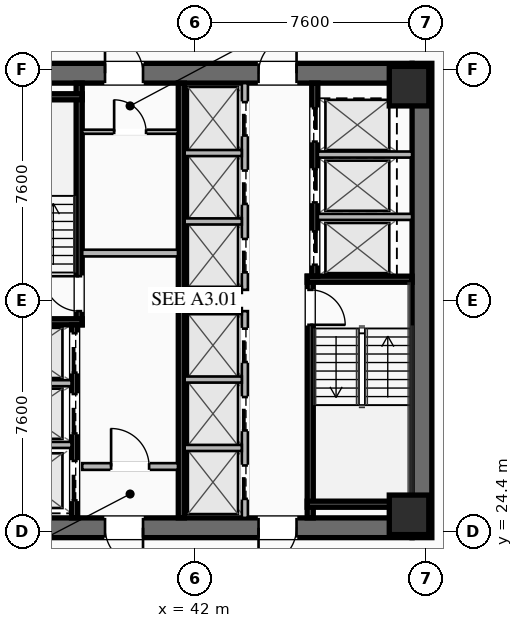
"""IFC4 building model, lengths in metres.
Left out: names, types, materials, properties, quantities, classifications, styles, units other than length and angle.
Written with IfcOpenShell. Run it as: python <this file> out.ifc"""

import sys

from ifc_helpers import new_model, si_unit, direction, frame, frame_2d, origin, origin_2d, place, context, subcontext, project, spatial, rectangle, hollow_rectangle, extrude, element, fill, save


model = new_model("IFC4")
c1 = context("Model", 3, precision=1e-05, world=origin(), true_north=direction((0.0, 1.0)))
c2 = subcontext(c1, "Body", "Model", "MODEL_VIEW")
j1 = project(units=[si_unit("LENGTHUNIT", "METRE"), si_unit("PLANEANGLEUNIT", "RADIAN")], contexts=[c1])
p1 = place(None, origin())
s1 = spatial("IfcSite", under=j1, at=p1, CompositionType="ELEMENT")
p2 = place(p1, origin())
s2 = spatial("IfcBuilding", under=s1, at=p2, CompositionType="ELEMENT")
p3 = place(p2, frame((0.0, 0.0, 106.25)))
s3 = spatial("IfcBuildingStorey", under=s2, at=p3, CompositionType="ELEMENT", Elevation=106.25)
p4 = place(p3, frame((49.475, 39.8, 0.0), z_axis=(0.0, 0.0, 1.0), x_axis=(0.0, -1.0, 0.0)))
e1 = element("IfcWall", 1, at=p4, inside=s3, PredefinedType="SHEAR", context=c2, shape_type="SweptSolid", body=[
    extrude(rectangle(XDim=15.6, YDim=0.65, at=frame_2d((7.8, 0.0))), origin(), (0.0, 0.0, 1.0), 3.55),
])
p5 = place(p3, frame((49.15, 24.525, 0.0), z_axis=(0.0, 0.0, 1.0), x_axis=(-1.0, 0.0, 0.0)))
e2 = element("IfcWall", 2, at=p5, inside=s3, PredefinedType="SHEAR", context=c2, shape_type="SweptSolid", body=[
    extrude(rectangle(XDim=14.3, YDim=0.65, at=frame_2d((7.15, 0.0))), origin(), (0.0, 0.0, 1.0), 3.55),
])
p6 = place(p5, frame((8.85, 0.0, 0.0)))
e3 = element("IfcOpeningElement", 3, at=p6, cuts=e2, PredefinedType="OPENING", context=c2, shape_type="SweptSolid", body=[
    extrude(rectangle(XDim=1.25, YDim=2.25, at=frame_2d((0.625, 1.125))), frame((0.0, 0.335, 0.0), z_axis=(0.0, -1.0, 0.0), x_axis=(1.0, 0.0, 0.0)), (0.0, 0.0, 1.0), 0.67),
])
p7 = place(p5, frame((3.8, 0.0, 0.0)))
e4 = element("IfcOpeningElement", 4, at=p7, cuts=e2, PredefinedType="OPENING", context=c2, shape_type="SweptSolid", body=[
    extrude(rectangle(XDim=1.25, YDim=2.25, at=frame_2d((0.625, 1.125))), frame((0.0, 0.335, 0.0), z_axis=(0.0, -1.0, 0.0), x_axis=(1.0, 0.0, 0.0)), (0.0, 0.0, 1.0), 0.67),
])
p8 = place(p3, frame((34.85, 39.475, 0.0), z_axis=(0.0, 0.0, 1.0), x_axis=(1.0, 0.0, 0.0)))
e5 = element("IfcWall", 5, at=p8, inside=s3, PredefinedType="SHEAR", context=c2, shape_type="SweptSolid", body=[
    extrude(rectangle(XDim=14.3, YDim=0.65, at=frame_2d((7.15, 0.0))), origin(), (0.0, 0.0, 1.0), 3.55),
])
p9 = place(p8, frame((4.2, 0.0, 0.0)))
e6 = element("IfcOpeningElement", 6, at=p9, cuts=e5, PredefinedType="OPENING", context=c2, shape_type="SweptSolid", body=[
    extrude(rectangle(XDim=1.25, YDim=2.25, at=frame_2d((0.625, 1.125))), frame((0.0, 0.335, 0.0), z_axis=(0.0, -1.0, 0.0), x_axis=(1.0, 0.0, 0.0)), (0.0, 0.0, 1.0), 0.67),
])
p10 = place(p8, frame((9.25, 0.0, 0.0)))
e7 = element("IfcOpeningElement", 7, at=p10, cuts=e5, PredefinedType="OPENING", context=c2, shape_type="SweptSolid", body=[
    extrude(rectangle(XDim=1.25, YDim=2.25, at=frame_2d((0.625, 1.125))), frame((0.0, 0.335, 0.0), z_axis=(0.0, -1.0, 0.0), x_axis=(1.0, 0.0, 0.0)), (0.0, 0.0, 1.0), 0.67),
])
for number, where, z_axis, x_axis in (
    (8, (49.05, 24.95, 0.0), (0.0, 0.0, 1.0), (1.0, 0.0, 0.0)),
    (9, (49.05, 39.05, 0.0), (0.0, 0.0, 1.0), (1.0, 0.0, 0.0)),
):
    element("IfcColumn", number, at=place(p3, frame(where, z_axis=z_axis, x_axis=x_axis)), inside=s3, PredefinedType="COLUMN", context=c2, shape_type="SweptSolid", body=[
        extrude(hollow_rectangle(XDim=1.3, YDim=1.3, WallThickness=0.05, at=origin_2d()), origin(), (0.0, 0.0, 1.0), 3.25),
    ])
p11 = place(p3, frame((38.2, 31.2, 0.0), z_axis=(0.0, 0.0, 1.0), x_axis=(0.0, 1.0, 0.0)))
e10 = element("IfcWall", 10, at=p11, inside=s3, PredefinedType="SHEAR", context=c2, shape_type="SweptSolid", body=[
    extrude(rectangle(XDim=7.95, YDim=0.2, at=frame_2d((3.975, 0.0))), origin(), (0.0, 0.0, 1.0), 3.25),
])
p12 = place(p11, frame((0.45, 0.0, 0.0)))
e11 = element("IfcOpeningElement", 11, at=p12, cuts=e10, PredefinedType="OPENING", context=c2, shape_type="SweptSolid", body=[
    extrude(rectangle(XDim=1.15, YDim=2.2, at=frame_2d((0.575, 1.1))), frame((0.0, 0.11, 0.0), z_axis=(0.0, -1.0, 0.0), x_axis=(1.0, 0.0, 0.0)), (0.0, 0.0, 1.0), 0.22),
])
for number, where, z_axis, x_axis in (
    (12, (34.85, 31.3, 0.0), (0.0, 0.0, 1.0), (1.0, 0.0, 0.0)),
    (13, (34.85, 38.7, 0.0), (0.0, 0.0, 1.0), (1.0, 0.0, 0.0)),
):
    element("IfcWall", number, at=place(p3, frame(where, z_axis=z_axis, x_axis=x_axis)), inside=s3, PredefinedType="SHEAR", context=c2, shape_type="SweptSolid", body=[
        extrude(rectangle(XDim=3.45, YDim=0.2, at=frame_2d((1.725, 0.0))), origin(), (0.0, 0.0, 1.0), 3.25),
    ])
p13 = place(p3, frame((45.8, 32.8, 0.0), z_axis=(0.0, 0.0, 1.0), x_axis=(0.0, -1.0, 0.0)))
e14 = element("IfcWall", 14, at=p13, inside=s3, PredefinedType="SHEAR", context=c2, shape_type="SweptSolid", body=[
    extrude(rectangle(XDim=7.95, YDim=0.2, at=frame_2d((3.975, 0.0))), origin(), (0.0, 0.0, 1.0), 3.25),
])
p14 = place(p13, frame((0.45, 0.0, 0.0)))
e15 = element("IfcOpeningElement", 15, at=p14, cuts=e14, PredefinedType="OPENING", context=c2, shape_type="SweptSolid", body=[
    extrude(rectangle(XDim=1.15, YDim=2.2, at=frame_2d((0.575, 1.1))), frame((0.0, 0.11, 0.0), z_axis=(0.0, -1.0, 0.0), x_axis=(1.0, 0.0, 0.0)), (0.0, 0.0, 1.0), 0.22),
])
for number, where, z_axis, x_axis in (
    (16, (45.7, 32.7, 0.0), (0.0, 0.0, 1.0), (1.0, 0.0, 0.0)),
    (17, (45.7, 25.3, 0.0), (0.0, 0.0, 1.0), (1.0, 0.0, 0.0)),
):
    element("IfcWall", number, at=place(p3, frame(where, z_axis=z_axis, x_axis=x_axis)), inside=s3, PredefinedType="SHEAR", context=c2, shape_type="SweptSolid", body=[
        extrude(rectangle(XDim=3.45, YDim=0.2, at=frame_2d((1.725, 0.0))), origin(), (0.0, 0.0, 1.0), 3.25),
    ])
p15 = place(p3, frame((41.56, 24.85, 0.0), z_axis=(0.0, 0.0, 1.0), x_axis=(0.0, 1.0, 0.0)))
e18 = element("IfcWall", 18, at=p15, inside=s3, PredefinedType="SHEAR", context=c2, shape_type="SweptSolid", body=[
    extrude(rectangle(XDim=14.3, YDim=0.2, at=frame_2d((7.15, 0.0))), origin(), (0.0, 0.0, 1.0), 3.25),
])
p16 = place(p3, frame((38.3, 33.56, 0.0), z_axis=(0.0, 0.0, 1.0), x_axis=(1.0, 0.0, 0.0)))
e19 = element("IfcWall", 19, at=p16, inside=s3, PredefinedType="SOLIDWALL", context=c2, shape_type="SweptSolid", body=[
    extrude(rectangle(XDim=3.15, YDim=0.22, at=frame_2d((1.575, 0.0))), origin(), (0.0, 0.0, 1.0), 2.393),
])
p17 = place(p3, frame((38.3, 26.54, 0.0), z_axis=(0.0, 0.0, 1.0), x_axis=(1.0, 0.0, 0.0)))
e20 = element("IfcWall", 20, at=p17, inside=s3, PredefinedType="SOLIDWALL", context=c2, shape_type="SweptSolid", body=[
    extrude(rectangle(XDim=3.15, YDim=0.22, at=frame_2d((1.575, 0.0))), origin(), (0.0, 0.0, 1.0), 2.393),
])
p18 = place(p17, frame((0.95, 0.0, 0.0)))
e21 = element("IfcOpeningElement", 21, at=p18, cuts=e20, PredefinedType="OPENING", context=c2, shape_type="SweptSolid", body=[
    extrude(rectangle(XDim=1.25, YDim=2.25, at=frame_2d((0.625, 1.125))), frame((0.0, 0.12, 0.0), z_axis=(0.0, -1.0, 0.0), x_axis=(1.0, 0.0, 0.0)), (0.0, 0.0, 1.0), 0.24),
])
p19 = place(p3, frame((38.05, 24.85, 0.0), z_axis=(0.0, 0.0, 1.0), x_axis=(0.0, 1.0, 0.0)))
e22 = element("IfcWall", 22, at=p19, inside=s3, PredefinedType="SHEAR", context=c2, shape_type="SweptSolid", body=[
    extrude(rectangle(XDim=6.35, YDim=0.2, at=frame_2d((3.175, 0.0))), origin(), (0.0, 0.0, 1.0), 3.25),
])
p20 = place(p19, frame((4.775, 0.0, 0.0)))
e23 = element("IfcOpeningElement", 23, at=p20, cuts=e22, PredefinedType="OPENING", context=c2, shape_type="SweptSolid", body=[
    extrude(rectangle(XDim=1.3, YDim=2.25, at=frame_2d((0.65, 1.125))), frame((0.0, 0.11, 0.0), z_axis=(0.0, -1.0, 0.0), x_axis=(1.0, 0.0, 0.0)), (0.0, 0.0, 1.0), 0.22),
])
p21 = place(p19, frame((2.775, 0.0, 0.0)))
e24 = element("IfcOpeningElement", 24, at=p21, cuts=e22, PredefinedType="OPENING", context=c2, shape_type="SweptSolid", body=[
    extrude(rectangle(XDim=1.3, YDim=2.25, at=frame_2d((0.65, 1.125))), frame((0.0, 0.11, 0.0), z_axis=(0.0, -1.0, 0.0), x_axis=(1.0, 0.0, 0.0)), (0.0, 0.0, 1.0), 0.22),
])
p22 = place(p19, frame((0.575, 0.0, 0.0)))
e25 = element("IfcOpeningElement", 25, at=p22, cuts=e22, PredefinedType="OPENING", context=c2, shape_type="SweptSolid", body=[
    extrude(rectangle(XDim=1.3, YDim=2.25, at=frame_2d((0.65, 1.125))), frame((0.0, 0.11, 0.0), z_axis=(0.0, -1.0, 0.0), x_axis=(1.0, 0.0, 0.0)), (0.0, 0.0, 1.0), 0.22),
])
for number, where, z_axis, x_axis in (
    (26, (34.85, 27.25, 0.0), (0.0, 0.0, 1.0), (1.0, 0.0, 0.0)),
    (27, (34.85, 29.28, 0.0), (0.0, 0.0, 1.0), (1.0, 0.0, 0.0)),
):
    element("IfcWall", number, at=place(p3, frame(where, z_axis=z_axis, x_axis=x_axis)), inside=s3, PredefinedType="SOLIDWALL", context=c2, shape_type="SweptSolid", body=[
        extrude(rectangle(XDim=3.1, YDim=0.2, at=frame_2d((1.55, 0.0))), origin(), (0.0, 0.0, 1.0), 3.25),
    ])
p23 = place(p3, frame((45.95, 39.15, 0.0), z_axis=(0.0, 0.0, 1.0), x_axis=(0.0, -1.0, 0.0)))
e28 = element("IfcWall", 28, at=p23, inside=s3, PredefinedType="SHEAR", context=c2, shape_type="SweptSolid", body=[
    extrude(rectangle(XDim=6.35, YDim=0.2, at=frame_2d((3.175, 0.0))), origin(), (0.0, 0.0, 1.0), 3.25),
])
p24 = place(p23, frame((4.875, 0.0, 0.0)))
e29 = element("IfcOpeningElement", 29, at=p24, cuts=e28, PredefinedType="OPENING", context=c2, shape_type="SweptSolid", body=[
    extrude(rectangle(XDim=1.1, YDim=2.2, at=frame_2d((0.55, 1.1))), frame((0.0, 0.11, 0.0), z_axis=(0.0, -1.0, 0.0), x_axis=(1.0, 0.0, 0.0)), (0.0, 0.0, 1.0), 0.22),
])
p25 = place(p23, frame((2.825, 0.0, 0.0)))
e30 = element("IfcOpeningElement", 30, at=p25, cuts=e28, PredefinedType="OPENING", context=c2, shape_type="SweptSolid", body=[
    extrude(rectangle(XDim=1.1, YDim=2.2, at=frame_2d((0.55, 1.1))), frame((0.0, 0.11, 0.0), z_axis=(0.0, -1.0, 0.0), x_axis=(1.0, 0.0, 0.0)), (0.0, 0.0, 1.0), 0.22),
])
p26 = place(p23, frame((0.825, 0.0, 0.0)))
e31 = element("IfcOpeningElement", 31, at=p26, cuts=e28, PredefinedType="OPENING", context=c2, shape_type="SweptSolid", body=[
    extrude(rectangle(XDim=1.1, YDim=2.2, at=frame_2d((0.55, 1.1))), frame((0.0, 0.11, 0.0), z_axis=(0.0, -1.0, 0.0), x_axis=(1.0, 0.0, 0.0)), (0.0, 0.0, 1.0), 0.22),
])
for number, where, z_axis, x_axis in (
    (32, (46.05, 34.75, 0.0), (0.0, 0.0, 1.0), (1.0, 0.0, 0.0)),
    (33, (46.05, 36.8, 0.0), (0.0, 0.0, 1.0), (1.0, 0.0, 0.0)),
):
    element("IfcWall", number, at=place(p3, frame(where, z_axis=z_axis, x_axis=x_axis)), inside=s3, PredefinedType="SOLIDWALL", context=c2, shape_type="SweptSolid", body=[
        extrude(rectangle(XDim=3.1, YDim=0.2, at=frame_2d((1.55, 0.0))), origin(), (0.0, 0.0, 1.0), 3.25),
    ])
p27 = place(p3, frame((38.3, 37.55, 0.0), z_axis=(0.0, 0.0, 1.0), x_axis=(1.0, 0.0, 0.0)))
e34 = element("IfcWall", 34, at=p27, inside=s3, PredefinedType="PARTITIONING", context=c2, shape_type="SweptSolid", body=[
    extrude(rectangle(XDim=3.15, YDim=0.135, at=frame_2d((1.575, 0.0))), origin(), (0.0, 0.0, 1.0), 2.393),
])
p28 = place(p27, frame((1.05, 0.0, 0.0)))
e35 = element("IfcOpeningElement", 35, at=p28, cuts=e34, PredefinedType="OPENING", context=c2, shape_type="SweptSolid", body=[
    extrude(rectangle(XDim=1.05, YDim=2.2, at=frame_2d((0.525, 1.1))), frame((0.0, 0.077, 0.0), z_axis=(0.0, -1.0, 0.0), x_axis=(1.0, 0.0, 0.0)), (0.0, 0.0, 1.0), 0.155),
])
p29 = place(p3, frame((43.65, 24.85, 0.0), z_axis=(0.0, 0.0, 1.0), x_axis=(0.0, 1.0, 0.0)))
e36 = element("IfcWall", 36, at=p29, inside=s3, PredefinedType="SOLIDWALL", context=c2, shape_type="SweptSolid", body=[
    extrude(rectangle(XDim=6.8, YDim=0.2, at=frame_2d((3.4, 0.0))), origin(), (0.0, 0.0, 1.0), 3.25),
])
p30 = place(p29, frame((0.625, 0.0, 0.0)))
e37 = element("IfcOpeningElement", 37, at=p30, cuts=e36, PredefinedType="OPENING", context=c2, shape_type="SweptSolid", body=[
    extrude(rectangle(XDim=1.1, YDim=2.2, at=frame_2d((0.55, 1.1))), frame((0.0, 0.11, 0.0), z_axis=(0.0, -1.0, 0.0), x_axis=(1.0, 0.0, 0.0)), (0.0, 0.0, 1.0), 0.22),
])
p31 = place(p29, frame((2.875, 0.0, 0.0)))
e38 = element("IfcOpeningElement", 38, at=p31, cuts=e36, PredefinedType="OPENING", context=c2, shape_type="SweptSolid", body=[
    extrude(rectangle(XDim=1.1, YDim=2.2, at=frame_2d((0.55, 1.1))), frame((0.0, 0.11, 0.0), z_axis=(0.0, -1.0, 0.0), x_axis=(1.0, 0.0, 0.0)), (0.0, 0.0, 1.0), 0.22),
])
p32 = place(p29, frame((5.125, 0.0, 0.0)))
e39 = element("IfcOpeningElement", 39, at=p32, cuts=e36, PredefinedType="OPENING", context=c2, shape_type="SweptSolid", body=[
    extrude(rectangle(XDim=1.1, YDim=2.2, at=frame_2d((0.55, 1.1))), frame((0.0, 0.11, 0.0), z_axis=(0.0, -1.0, 0.0), x_axis=(1.0, 0.0, 0.0)), (0.0, 0.0, 1.0), 0.22),
])
for number, where, z_axis, x_axis in (
    (40, (41.67, 27.15, 0.0), (0.0, 0.0, 1.0), (1.0, 0.0, 0.0)),
    (41, (41.67, 29.4, 0.0), (0.0, 0.0, 1.0), (1.0, 0.0, 0.0)),
    (42, (41.67, 31.65, 0.0), (0.0, 0.0, 1.0), (1.0, 0.0, 0.0)),
):
    element("IfcWall", number, at=place(p3, frame(where, z_axis=z_axis, x_axis=x_axis)), inside=s3, PredefinedType="SOLIDWALL", context=c2, shape_type="SweptSolid", body=[
        extrude(rectangle(XDim=1.88, YDim=0.2, at=frame_2d((0.94, 0.0))), origin(), (0.0, 0.0, 1.0), 3.25),
    ])
p33 = place(p3, frame((43.65, 32.35, 0.0), z_axis=(0.0, 0.0, 1.0), x_axis=(0.0, 1.0, 0.0)))
e43 = element("IfcWall", 43, at=p33, inside=s3, PredefinedType="SOLIDWALL", context=c2, shape_type="SweptSolid", body=[
    extrude(rectangle(XDim=6.8, YDim=0.2, at=frame_2d((3.4, 0.0))), origin(), (0.0, 0.0, 1.0), 3.25),
])
p34 = place(p33, frame((0.575, 0.0, 0.0)))
e44 = element("IfcOpeningElement", 44, at=p34, cuts=e43, PredefinedType="OPENING", context=c2, shape_type="SweptSolid", body=[
    extrude(rectangle(XDim=1.1, YDim=2.2, at=frame_2d((0.55, 1.1))), frame((0.0, 0.11, 0.0), z_axis=(0.0, -1.0, 0.0), x_axis=(1.0, 0.0, 0.0)), (0.0, 0.0, 1.0), 0.22),
])
p35 = place(p33, frame((2.825, 0.0, 0.0)))
e45 = element("IfcOpeningElement", 45, at=p35, cuts=e43, PredefinedType="OPENING", context=c2, shape_type="SweptSolid", body=[
    extrude(rectangle(XDim=1.1, YDim=2.2, at=frame_2d((0.55, 1.1))), frame((0.0, 0.11, 0.0), z_axis=(0.0, -1.0, 0.0), x_axis=(1.0, 0.0, 0.0)), (0.0, 0.0, 1.0), 0.22),
])
p36 = place(p33, frame((5.075, 0.0, 0.0)))
e46 = element("IfcOpeningElement", 46, at=p36, cuts=e43, PredefinedType="OPENING", context=c2, shape_type="SweptSolid", body=[
    extrude(rectangle(XDim=1.1, YDim=2.2, at=frame_2d((0.55, 1.1))), frame((0.0, 0.11, 0.0), z_axis=(0.0, -1.0, 0.0), x_axis=(1.0, 0.0, 0.0)), (0.0, 0.0, 1.0), 0.22),
])
for number, where, z_axis, x_axis in (
    (47, (41.67, 32.35, 0.0), (0.0, 0.0, 1.0), (1.0, 0.0, 0.0)),
    (48, (41.67, 34.6, 0.0), (0.0, 0.0, 1.0), (1.0, 0.0, 0.0)),
    (49, (41.67, 36.85, 0.0), (0.0, 0.0, 1.0), (1.0, 0.0, 0.0)),
):
    element("IfcWall", number, at=place(p3, frame(where, z_axis=z_axis, x_axis=x_axis)), inside=s3, PredefinedType="SOLIDWALL", context=c2, shape_type="SweptSolid", body=[
        extrude(rectangle(XDim=1.88, YDim=0.2, at=frame_2d((0.94, 0.0))), origin(), (0.0, 0.0, 1.0), 3.25),
    ])
p37 = place(p9, origin())
e50 = element("IfcDoor", 50, at=p37, inside=s3, OperationType="SINGLE_SWING_LEFT", PredefinedType="DOOR", context=c2, shape_type="SweptSolid", body=[
    extrude(rectangle(XDim=1.25, YDim=2.25, at=frame_2d((0.625, 1.125))), frame((0.0, 0.025, 0.0), z_axis=(0.0, -1.0, 0.0), x_axis=(1.0, 0.0, 0.0)), (0.0, 0.0, 1.0), 0.05),
])
fill(e6, e50)
p38 = place(p10, origin())
e51 = element("IfcDoor", 51, at=p38, inside=s3, OperationType="SINGLE_SWING_RIGHT", PredefinedType="DOOR", context=c2, shape_type="SweptSolid", body=[
    extrude(rectangle(XDim=1.25, YDim=2.25, at=frame_2d((0.625, 1.125))), frame((0.0, 0.025, 0.0), z_axis=(0.0, -1.0, 0.0), x_axis=(1.0, 0.0, 0.0)), (0.0, 0.0, 1.0), 0.05),
])
fill(e7, e51)
p39 = place(p6, origin())
e52 = element("IfcDoor", 52, at=p39, inside=s3, OperationType="SINGLE_SWING_LEFT", PredefinedType="DOOR", context=c2, shape_type="SweptSolid", body=[
    extrude(rectangle(XDim=1.25, YDim=2.25, at=frame_2d((0.625, 1.125))), frame((0.0, 0.025, 0.0), z_axis=(0.0, -1.0, 0.0), x_axis=(1.0, 0.0, 0.0)), (0.0, 0.0, 1.0), 0.05),
])
fill(e3, e52)
p40 = place(p7, origin())
e53 = element("IfcDoor", 53, at=p40, inside=s3, OperationType="SINGLE_SWING_RIGHT", PredefinedType="DOOR", context=c2, shape_type="SweptSolid", body=[
    extrude(rectangle(XDim=1.25, YDim=2.25, at=frame_2d((0.625, 1.125))), frame((0.0, 0.025, 0.0), z_axis=(0.0, -1.0, 0.0), x_axis=(1.0, 0.0, 0.0)), (0.0, 0.0, 1.0), 0.05),
])
fill(e4, e53)
p41 = place(p12, origin())
e54 = element("IfcDoor", 54, at=p41, inside=s3, OperationType="SINGLE_SWING_RIGHT", PredefinedType="DOOR", context=c2, shape_type="SweptSolid", body=[
    extrude(rectangle(XDim=1.15, YDim=2.2, at=frame_2d((0.575, 1.1))), frame((0.0, 0.025, 0.0), z_axis=(0.0, -1.0, 0.0), x_axis=(1.0, 0.0, 0.0)), (0.0, 0.0, 1.0), 0.05),
])
fill(e11, e54)
p42 = place(p14, origin())
e55 = element("IfcDoor", 55, at=p42, inside=s3, OperationType="SINGLE_SWING_RIGHT", PredefinedType="DOOR", context=c2, shape_type="SweptSolid", body=[
    extrude(rectangle(XDim=1.15, YDim=2.2, at=frame_2d((0.575, 1.1))), frame((0.0, 0.025, 0.0), z_axis=(0.0, -1.0, 0.0), x_axis=(1.0, 0.0, 0.0)), (0.0, 0.0, 1.0), 0.05),
])
fill(e15, e55)
p43 = place(p18, origin())
e56 = element("IfcDoor", 56, at=p43, inside=s3, OperationType="SINGLE_SWING_LEFT", PredefinedType="DOOR", context=c2, shape_type="SweptSolid", body=[
    extrude(rectangle(XDim=1.25, YDim=2.25, at=frame_2d((0.625, 1.125))), frame((0.0, 0.025, 0.0), z_axis=(0.0, -1.0, 0.0), x_axis=(1.0, 0.0, 0.0)), (0.0, 0.0, 1.0), 0.05),
])
fill(e21, e56)
p44 = place(p28, origin())
e57 = element("IfcDoor", 57, at=p44, inside=s3, OperationType="SINGLE_SWING_LEFT", PredefinedType="DOOR", context=c2, shape_type="SweptSolid", body=[
    extrude(rectangle(XDim=1.05, YDim=2.2, at=frame_2d((0.525, 1.1))), frame((0.0, 0.025, 0.0), z_axis=(0.0, -1.0, 0.0), x_axis=(1.0, 0.0, 0.0)), (0.0, 0.0, 1.0), 0.05),
])
fill(e35, e57)
p45 = place(p20, origin())
e58 = element("IfcDoor", 58, at=p45, inside=s3, OperationType="SLIDING_TO_LEFT", PredefinedType="DOOR", context=c2, shape_type="SweptSolid", body=[
    extrude(rectangle(XDim=1.3, YDim=2.25, at=frame_2d((0.65, 1.125))), frame((0.0, 0.025, 0.0), z_axis=(0.0, -1.0, 0.0), x_axis=(1.0, 0.0, 0.0)), (0.0, 0.0, 1.0), 0.05),
])
fill(e23, e58)
p46 = place(p21, origin())
e59 = element("IfcDoor", 59, at=p46, inside=s3, OperationType="SLIDING_TO_LEFT", PredefinedType="DOOR", context=c2, shape_type="SweptSolid", body=[
    extrude(rectangle(XDim=1.3, YDim=2.25, at=frame_2d((0.65, 1.125))), frame((0.0, 0.025, 0.0), z_axis=(0.0, -1.0, 0.0), x_axis=(1.0, 0.0, 0.0)), (0.0, 0.0, 1.0), 0.05),
])
fill(e24, e59)
p47 = place(p22, origin())
e60 = element("IfcDoor", 60, at=p47, inside=s3, OperationType="SLIDING_TO_LEFT", PredefinedType="DOOR", context=c2, shape_type="SweptSolid", body=[
    extrude(rectangle(XDim=1.3, YDim=2.25, at=frame_2d((0.65, 1.125))), frame((0.0, 0.025, 0.0), z_axis=(0.0, -1.0, 0.0), x_axis=(1.0, 0.0, 0.0)), (0.0, 0.0, 1.0), 0.05),
])
fill(e25, e60)
p48 = place(p30, origin())
e61 = element("IfcDoor", 61, at=p48, inside=s3, OperationType="SLIDING_TO_LEFT", PredefinedType="DOOR", context=c2, shape_type="SweptSolid", body=[
    extrude(rectangle(XDim=1.1, YDim=2.2, at=frame_2d((0.55, 1.1))), frame((0.0, 0.025, 0.0), z_axis=(0.0, -1.0, 0.0), x_axis=(1.0, 0.0, 0.0)), (0.0, 0.0, 1.0), 0.05),
])
fill(e37, e61)
p49 = place(p31, origin())
e62 = element("IfcDoor", 62, at=p49, inside=s3, OperationType="SLIDING_TO_LEFT", PredefinedType="DOOR", context=c2, shape_type="SweptSolid", body=[
    extrude(rectangle(XDim=1.1, YDim=2.2, at=frame_2d((0.55, 1.1))), frame((0.0, 0.025, 0.0), z_axis=(0.0, -1.0, 0.0), x_axis=(1.0, 0.0, 0.0)), (0.0, 0.0, 1.0), 0.05),
])
fill(e38, e62)
p50 = place(p32, origin())
e63 = element("IfcDoor", 63, at=p50, inside=s3, OperationType="SLIDING_TO_LEFT", PredefinedType="DOOR", context=c2, shape_type="SweptSolid", body=[
    extrude(rectangle(XDim=1.1, YDim=2.2, at=frame_2d((0.55, 1.1))), frame((0.0, 0.025, 0.0), z_axis=(0.0, -1.0, 0.0), x_axis=(1.0, 0.0, 0.0)), (0.0, 0.0, 1.0), 0.05),
])
fill(e39, e63)
p51 = place(p34, origin())
e64 = element("IfcDoor", 64, at=p51, inside=s3, OperationType="SLIDING_TO_LEFT", PredefinedType="DOOR", context=c2, shape_type="SweptSolid", body=[
    extrude(rectangle(XDim=1.1, YDim=2.2, at=frame_2d((0.55, 1.1))), frame((0.0, 0.025, 0.0), z_axis=(0.0, -1.0, 0.0), x_axis=(1.0, 0.0, 0.0)), (0.0, 0.0, 1.0), 0.05),
])
fill(e44, e64)
p52 = place(p35, origin())
e65 = element("IfcDoor", 65, at=p52, inside=s3, OperationType="SLIDING_TO_LEFT", PredefinedType="DOOR", context=c2, shape_type="SweptSolid", body=[
    extrude(rectangle(XDim=1.1, YDim=2.2, at=frame_2d((0.55, 1.1))), frame((0.0, 0.025, 0.0), z_axis=(0.0, -1.0, 0.0), x_axis=(1.0, 0.0, 0.0)), (0.0, 0.0, 1.0), 0.05),
])
fill(e45, e65)
p53 = place(p36, origin())
e66 = element("IfcDoor", 66, at=p53, inside=s3, OperationType="SLIDING_TO_LEFT", PredefinedType="DOOR", context=c2, shape_type="SweptSolid", body=[
    extrude(rectangle(XDim=1.1, YDim=2.2, at=frame_2d((0.55, 1.1))), frame((0.0, 0.025, 0.0), z_axis=(0.0, -1.0, 0.0), x_axis=(1.0, 0.0, 0.0)), (0.0, 0.0, 1.0), 0.05),
])
fill(e46, e66)
p54 = place(p24, origin())
e67 = element("IfcDoor", 67, at=p54, inside=s3, OperationType="SLIDING_TO_LEFT", PredefinedType="DOOR", context=c2, shape_type="SweptSolid", body=[
    extrude(rectangle(XDim=1.1, YDim=2.2, at=frame_2d((0.55, 1.1))), frame((0.0, 0.025, 0.0), z_axis=(0.0, -1.0, 0.0), x_axis=(1.0, 0.0, 0.0)), (0.0, 0.0, 1.0), 0.05),
])
fill(e29, e67)
p55 = place(p25, origin())
e68 = element("IfcDoor", 68, at=p55, inside=s3, OperationType="SLIDING_TO_LEFT", PredefinedType="DOOR", context=c2, shape_type="SweptSolid", body=[
    extrude(rectangle(XDim=1.1, YDim=2.2, at=frame_2d((0.55, 1.1))), frame((0.0, 0.025, 0.0), z_axis=(0.0, -1.0, 0.0), x_axis=(1.0, 0.0, 0.0)), (0.0, 0.0, 1.0), 0.05),
])
fill(e30, e68)
p56 = place(p26, origin())
e69 = element("IfcDoor", 69, at=p56, inside=s3, OperationType="SLIDING_TO_LEFT", PredefinedType="DOOR", context=c2, shape_type="SweptSolid", body=[
    extrude(rectangle(XDim=1.1, YDim=2.2, at=frame_2d((0.55, 1.1))), frame((0.0, 0.025, 0.0), z_axis=(0.0, -1.0, 0.0), x_axis=(1.0, 0.0, 0.0)), (0.0, 0.0, 1.0), 0.05),
])
fill(e31, e69)
save(model, sys.argv[1])
